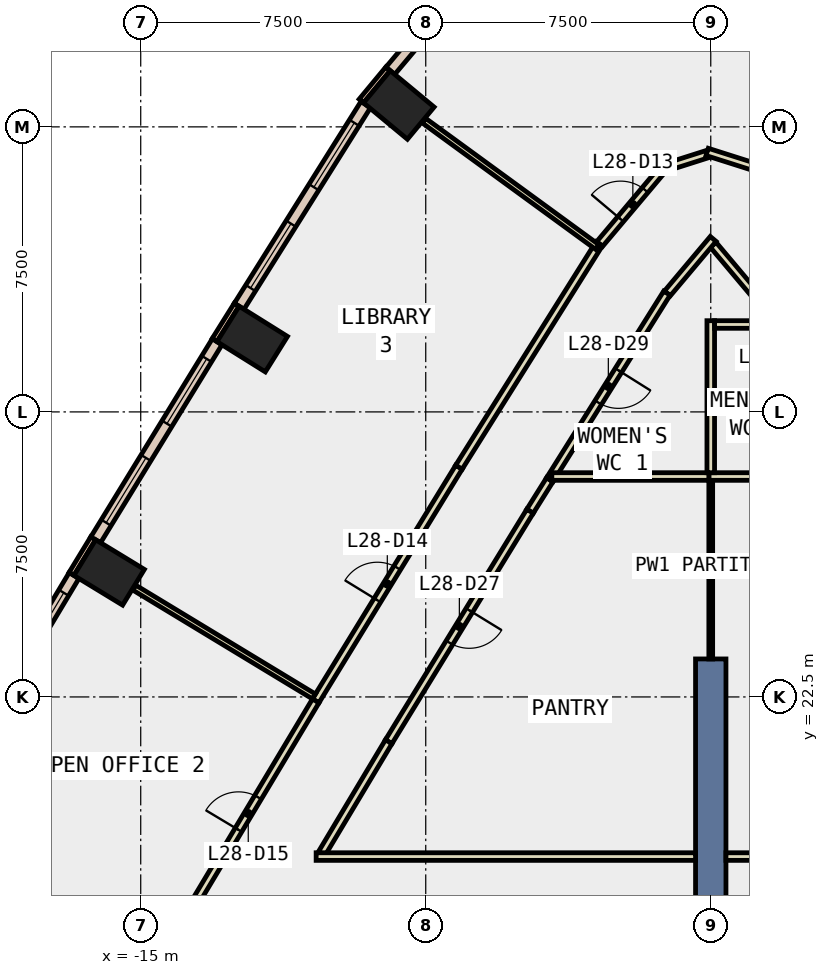
"""IFC4 building model, lengths in metres.
Left out: names, types, materials, properties, quantities, classifications, styles, units other than length and angle.
Written with IfcOpenShell. Run it as: python <this file> out.ifc"""

import sys

from ifc_helpers import new_model, si_unit, direction, frame, frame_2d, origin, origin_2d, place, context, subcontext, project, spatial, rectangle, extrude, element, fill, save


model = new_model("IFC4")
c1 = context("Model", 3, precision=1e-05, world=origin(), true_north=direction((0.0, 1.0)))
c2 = subcontext(c1, "Body", "Model", "MODEL_VIEW")
j1 = project(units=[si_unit("LENGTHUNIT", "METRE"), si_unit("PLANEANGLEUNIT", "RADIAN")], contexts=[c1])
p1 = place(None, origin())
s1 = spatial("IfcSite", under=j1, at=p1, CompositionType="ELEMENT")
p2 = place(p1, origin())
s2 = spatial("IfcBuilding", under=s1, at=p2, CompositionType="ELEMENT")
p3 = place(p2, frame((0.0, 0.0, 128.6)))
s3 = spatial("IfcBuildingStorey", under=s2, at=p3, CompositionType="ELEMENT", Elevation=128.6)
for number, where, z_axis, x_axis in (
    (1, (-8.208, 38.077, -0.4), (0.0, 0.0, 1.0), (0.638, 0.77, 0.0)),
    (2, (-12.066, 31.917, -0.4), (0.0, 0.0, 1.0), (0.53, 0.848, 0.0)),
    (3, (-15.831, 25.776, -0.4), (0.0, 0.0, 1.0), (0.52, 0.854, 0.0)),
):
    element("IfcColumn", number, at=place(p3, frame(where, z_axis=z_axis, x_axis=x_axis)), inside=s3, PredefinedType="COLUMN", context=c2, shape_type="SweptSolid", body=[
        extrude(rectangle(XDim=1.1, YDim=1.5, at=origin_2d()), origin(), (0.0, 0.0, 1.0), 4.0),
    ])
p4 = place(p3, frame((0.0, 14.5, -0.4), z_axis=(0.0, 0.0, 1.0), x_axis=(0.0, 1.0, 0.0)))
e4 = element("IfcWall", 4, at=p4, inside=s3, PredefinedType="SHEAR", context=c2, shape_type="SweptSolid", body=[
    extrude(rectangle(XDim=9.0, YDim=0.8, at=frame_2d((4.5, 0.0))), origin(), (0.0, 0.0, 1.0), 4.0),
])
p5 = place(p3, frame((-8.492, 39.027, 0.0), z_axis=(0.0, 0.0, 1.0), x_axis=(-0.638566874111, -0.769566337159, 0.0)))
e5 = element("IfcWall", 5, at=p5, inside=s3, PredefinedType="STANDARD", context=c2, shape_type="SweptSolid", body=[
    extrude(rectangle(XDim=1.1, YDim=0.15, at=frame_2d((0.55, 0.0))), origin(), (0.0, 0.0, 1.0), 3.6),
])
p6 = place(p3, frame((-12.474, 32.821, 0.0), z_axis=(0.0, 0.0, 1.0), x_axis=(-0.529719642941, -0.848172800721, 0.0)))
e6 = element("IfcWall", 6, at=p6, inside=s3, PredefinedType="STANDARD", context=c2, shape_type="SweptSolid", body=[
    extrude(rectangle(XDim=1.1, YDim=0.15, at=frame_2d((0.55, 0.0))), origin(), (0.0, 0.0, 1.0), 3.6),
])
p7 = place(p3, frame((-16.25, 26.675, 0.0), z_axis=(0.0, 0.0, 1.0), x_axis=(-0.519869515594, -0.854245682901, 0.0)))
e7 = element("IfcWall", 7, at=p7, inside=s3, PredefinedType="STANDARD", context=c2, shape_type="SweptSolid", body=[
    extrude(rectangle(XDim=1.1, YDim=0.15, at=frame_2d((0.55, 0.0))), origin(), (0.0, 0.0, 1.0), 3.6),
])
p8 = place(p3, frame((-5.767, 42.142, 0.0), z_axis=(0.0, 0.0, 1.0), x_axis=(-0.643948600943, -0.765068754652, 0.0)))
e8 = element("IfcWall", 8, at=p8, inside=s3, PredefinedType="STANDARD", context=c2, shape_type="SweptSolid", body=[
    extrude(rectangle(XDim=4.138, YDim=0.3, at=frame_2d((2.069, 0.0))), origin(), (0.0, 0.0, 1.0), 3.6),
])
p9 = place(p8, frame((1.369, 0.0, 0.9)))
e9 = element("IfcOpeningElement", 9, at=p9, cuts=e8, PredefinedType="OPENING", context=c2, shape_type="SweptSolid", body=[
    extrude(rectangle(XDim=1.4, YDim=2.6, at=frame_2d((0.7, 1.3))), frame((0.0, 0.16, 0.0), z_axis=(0.0, -1.0, 0.0), x_axis=(1.0, 0.0, 0.0)), (0.0, 0.0, 1.0), 0.32),
])
p10 = place(p3, frame((-9.079, 38.086, 0.0), z_axis=(0.0, 0.0, 1.0), x_axis=(-0.53160564075, -0.846991996847, 0.0)))
e10 = element("IfcWall", 10, at=p10, inside=s3, PredefinedType="STANDARD", context=c2, shape_type="SweptSolid", body=[
    extrude(rectangle(XDim=6.266, YDim=0.3, at=frame_2d((3.133, 0.0))), origin(), (0.0, 0.0, 1.0), 3.6),
])
p11 = place(p10, frame((0.566, 0.0, 0.9)))
e11 = element("IfcOpeningElement", 11, at=p11, cuts=e10, PredefinedType="OPENING", context=c2, shape_type="SweptSolid", body=[
    extrude(rectangle(XDim=2.0, YDim=2.6, at=frame_2d((1.0, 1.3))), frame((0.0, 0.16, 0.0), z_axis=(0.0, -1.0, 0.0), x_axis=(1.0, 0.0, 0.0)), (0.0, 0.0, 1.0), 0.32),
])
p12 = place(p10, frame((3.699, 0.0, 0.9)))
e12 = element("IfcOpeningElement", 12, at=p12, cuts=e10, PredefinedType="OPENING", context=c2, shape_type="SweptSolid", body=[
    extrude(rectangle(XDim=2.0, YDim=2.6, at=frame_2d((1.0, 1.3))), frame((0.0, 0.16, 0.0), z_axis=(0.0, -1.0, 0.0), x_axis=(1.0, 0.0, 0.0)), (0.0, 0.0, 1.0), 0.32),
])
p13 = place(p3, frame((-12.989, 31.846, 0.0), z_axis=(0.0, 0.0, 1.0), x_axis=(-0.522757750181, -0.8524812811, 0.0)))
e13 = element("IfcWall", 13, at=p13, inside=s3, PredefinedType="STANDARD", context=c2, shape_type="SweptSolid", body=[
    extrude(rectangle(XDim=6.114, YDim=0.3, at=frame_2d((3.057, 0.0))), origin(), (0.0, 0.0, 1.0), 3.6),
])
p14 = place(p13, frame((0.528, 0.0, 0.9)))
e14 = element("IfcOpeningElement", 14, at=p14, cuts=e13, PredefinedType="OPENING", context=c2, shape_type="SweptSolid", body=[
    extrude(rectangle(XDim=2.0, YDim=2.6, at=frame_2d((1.0, 1.3))), frame((0.0, 0.16, 0.0), z_axis=(0.0, -1.0, 0.0), x_axis=(1.0, 0.0, 0.0)), (0.0, 0.0, 1.0), 0.32),
])
p15 = place(p13, frame((3.585, 0.0, 0.9)))
e15 = element("IfcOpeningElement", 15, at=p15, cuts=e13, PredefinedType="OPENING", context=c2, shape_type="SweptSolid", body=[
    extrude(rectangle(XDim=2.0, YDim=2.6, at=frame_2d((1.0, 1.3))), frame((0.0, 0.16, 0.0), z_axis=(0.0, -1.0, 0.0), x_axis=(1.0, 0.0, 0.0)), (0.0, 0.0, 1.0), 0.32),
])
p16 = place(p3, frame((-16.754, 25.695, 0.0), z_axis=(0.0, 0.0, 1.0), x_axis=(-0.513708729904, -0.857964650099, 0.0)))
e16 = element("IfcWall", 16, at=p16, inside=s3, PredefinedType="STANDARD", context=c2, shape_type="SweptSolid", body=[
    extrude(rectangle(XDim=6.115, YDim=0.3, at=frame_2d((3.057, 0.0))), origin(), (0.0, 0.0, 1.0), 3.6),
])
p17 = place(p16, frame((0.529, 0.0, 0.9)))
e17 = element("IfcOpeningElement", 17, at=p17, cuts=e16, PredefinedType="OPENING", context=c2, shape_type="SweptSolid", body=[
    extrude(rectangle(XDim=2.0, YDim=2.6, at=frame_2d((1.0, 1.3))), frame((0.0, 0.16, 0.0), z_axis=(0.0, -1.0, 0.0), x_axis=(1.0, 0.0, 0.0)), (0.0, 0.0, 1.0), 0.32),
])
p18 = place(p16, frame((3.586, 0.0, 0.9)))
e18 = element("IfcOpeningElement", 18, at=p18, cuts=e16, PredefinedType="OPENING", context=c2, shape_type="SweptSolid", body=[
    extrude(rectangle(XDim=2.0, YDim=2.6, at=frame_2d((1.0, 1.3))), frame((0.0, 0.16, 0.0), z_axis=(0.0, -1.0, 0.0), x_axis=(1.0, 0.0, 0.0)), (0.0, 0.0, 1.0), 0.32),
])
p19 = place(p3, frame((-4.236, 28.215, 0.0), z_axis=(0.0, 0.0, 1.0), x_axis=(-0.531343659666, -0.84715637006, 0.0)))
e19 = element("IfcWall", 19, at=p19, inside=s3, PredefinedType="PARTITIONING", context=c2, shape_type="SweptSolid", body=[
    extrude(rectangle(XDim=0.979, YDim=0.2, at=frame_2d((0.489, 0.0))), origin(), (0.0, 0.0, 1.0), 3.6),
])
p20 = place(p3, frame((-4.756, 27.386, 0.0), z_axis=(0.0, 0.0, 1.0), x_axis=(-0.522743103274, -0.852490262689, 0.0)))
e20 = element("IfcWall", 20, at=p20, inside=s3, PredefinedType="PARTITIONING", context=c2, shape_type="SweptSolid", body=[
    extrude(rectangle(XDim=7.115, YDim=0.2, at=frame_2d((3.557, 0.0))), origin(), (0.0, 0.0, 1.0), 3.6),
])
p21 = place(p20, frame((3.057, 0.0, 0.0)))
e21 = element("IfcOpeningElement", 21, at=p21, cuts=e20, PredefinedType="OPENING", context=c2, shape_type="SweptSolid", body=[
    extrude(rectangle(XDim=1.0, YDim=2.1, at=frame_2d((0.5, 1.05))), frame((0.0, 0.11, 0.0), z_axis=(0.0, -1.0, 0.0), x_axis=(1.0, 0.0, 0.0)), (0.0, 0.0, 1.0), 0.22),
])
p22 = place(p3, frame((-8.475, 21.321, 0.0), z_axis=(0.0, 0.0, 1.0), x_axis=(-0.513592824646, -0.858034038062, 0.0)))
e22 = element("IfcWall", 22, at=p22, inside=s3, PredefinedType="PARTITIONING", context=c2, shape_type="SweptSolid", body=[
    extrude(rectangle(XDim=3.421, YDim=0.2, at=frame_2d((1.71, 0.0))), origin(), (0.0, 0.0, 1.0), 3.6),
])
p23 = place(p3, frame((1.271, 32.964, 0.0), z_axis=(0.0, 0.0, 1.0), x_axis=(-0.644007376392, 0.765019280249, 0.0)))
e23 = element("IfcWall", 23, at=p23, inside=s3, PredefinedType="PARTITIONING", context=c2, shape_type="SweptSolid", body=[
    extrude(rectangle(XDim=1.874, YDim=0.2, at=frame_2d((0.937, 0.0))), origin(), (0.0, 0.0, 1.0), 3.6),
])
p24 = place(p3, frame((0.064, 34.551, 0.0), z_axis=(0.0, 0.0, 1.0), x_axis=(-0.643638095982, -0.765329995101, 0.0)))
e24 = element("IfcWall", 24, at=p24, inside=s3, PredefinedType="PARTITIONING", context=c2, shape_type="SweptSolid", body=[
    extrude(rectangle(XDim=1.874, YDim=0.2, at=frame_2d((0.937, 0.0))), origin(), (0.0, 0.0, 1.0), 3.6),
])
p25 = place(p3, frame((-1.154, 33.125, 0.0), z_axis=(0.0, 0.0, 1.0), x_axis=(-0.531652223099, -0.846962758139, 0.0)))
e25 = element("IfcWall", 25, at=p25, inside=s3, PredefinedType="PARTITIONING", context=c2, shape_type="SweptSolid", body=[
    extrude(rectangle(XDim=5.797, YDim=0.2, at=frame_2d((2.898, 0.0))), origin(), (0.0, 0.0, 1.0), 3.6),
])
p26 = place(p25, frame((2.399, 0.0, 0.0)))
e26 = element("IfcOpeningElement", 26, at=p26, cuts=e25, PredefinedType="OPENING", context=c2, shape_type="SweptSolid", body=[
    extrude(rectangle(XDim=1.0, YDim=2.1, at=frame_2d((0.5, 1.05))), frame((0.0, 0.11, 0.0), z_axis=(0.0, -1.0, 0.0), x_axis=(1.0, 0.0, 0.0)), (0.0, 0.0, 1.0), 0.22),
])
p27 = place(p3, frame((-2.924, 34.417, 0.0), z_axis=(0.0, 0.0, 1.0), x_axis=(0.644113583568, 0.764929860486, 0.0)))
e27 = element("IfcWall", 27, at=p27, inside=s3, PredefinedType="PARTITIONING", context=c2, shape_type="SweptSolid", body=[
    extrude(rectangle(XDim=2.714, YDim=0.2, at=frame_2d((1.357, 0.0))), origin(), (0.0, 0.0, 1.0), 3.6),
])
p28 = place(p27, frame((0.857, 0.0, 0.0)))
e28 = element("IfcOpeningElement", 28, at=p28, cuts=e27, PredefinedType="OPENING", context=c2, shape_type="SweptSolid", body=[
    extrude(rectangle(XDim=1.0, YDim=2.1, at=frame_2d((0.5, 1.05))), frame((0.0, 0.11, 0.0), z_axis=(0.0, -1.0, 0.0), x_axis=(1.0, 0.0, 0.0)), (0.0, 0.0, 1.0), 0.22),
])
p29 = place(p3, frame((-1.145, 36.447, 0.0), z_axis=(0.0, 0.0, 1.0), x_axis=(0.952957783381, 0.303103056886, 0.0)))
e29 = element("IfcWall", 29, at=p29, inside=s3, PredefinedType="PARTITIONING", context=c2, shape_type="SweptSolid", body=[
    extrude(rectangle(XDim=1.102, YDim=0.2, at=frame_2d((0.551, 0.0))), origin(), (0.0, 0.0, 1.0), 3.6),
])
p30 = place(p3, frame((-0.095, 36.841, 0.0), z_axis=(0.0, 0.0, 1.0), x_axis=(0.953036611979, -0.302855107646, 0.0)))
e30 = element("IfcWall", 30, at=p30, inside=s3, PredefinedType="PARTITIONING", context=c2, shape_type="SweptSolid", body=[
    extrude(rectangle(XDim=1.301, YDim=0.2, at=frame_2d((0.65, 0.0))), origin(), (0.0, 0.0, 1.0), 3.6),
])
p31 = place(p3, frame((-10.396, 22.397, 0.0), z_axis=(0.0, 0.0, 1.0), x_axis=(0.522695398968, 0.852519512913, 0.0)))
e31 = element("IfcWall", 31, at=p31, inside=s3, PredefinedType="PARTITIONING", context=c2, shape_type="SweptSolid", body=[
    extrude(rectangle(XDim=7.213, YDim=0.2, at=frame_2d((3.606, 0.0))), origin(), (0.0, 0.0, 1.0), 3.6),
])
p32 = place(p31, frame((3.106, 0.0, 0.0)))
e32 = element("IfcOpeningElement", 32, at=p32, cuts=e31, PredefinedType="OPENING", context=c2, shape_type="SweptSolid", body=[
    extrude(rectangle(XDim=1.0, YDim=2.1, at=frame_2d((0.5, 1.05))), frame((0.0, 0.11, 0.0), z_axis=(0.0, -1.0, 0.0), x_axis=(1.0, 0.0, 0.0)), (0.0, 0.0, 1.0), 0.22),
])
p33 = place(p3, frame((-6.626, 28.546, 0.0), z_axis=(0.0, 0.0, 1.0), x_axis=(0.531701842465, 0.846931609234, 0.0)))
e33 = element("IfcWall", 33, at=p33, inside=s3, PredefinedType="PARTITIONING", context=c2, shape_type="SweptSolid", body=[
    extrude(rectangle(XDim=6.942, YDim=0.2, at=frame_2d((3.471, 0.0))), origin(), (0.0, 0.0, 1.0), 3.6),
])
p34 = place(p3, frame((-14.023, 16.338, 0.0), z_axis=(0.0, 0.0, 1.0), x_axis=(0.513773581048, 0.857925816966, 0.0)))
e34 = element("IfcWall", 34, at=p34, inside=s3, PredefinedType="PARTITIONING", context=c2, shape_type="SweptSolid", body=[
    extrude(rectangle(XDim=7.061, YDim=0.2, at=frame_2d((3.531, 0.0))), origin(), (0.0, 0.0, 1.0), 3.6),
])
p35 = place(p34, frame((3.106, 0.0, 0.0)))
e35 = element("IfcOpeningElement", 35, at=p35, cuts=e34, PredefinedType="OPENING", context=c2, shape_type="SweptSolid", body=[
    extrude(rectangle(XDim=1.0, YDim=2.1, at=frame_2d((0.5, 1.05))), frame((0.0, 0.11, 0.0), z_axis=(0.0, -1.0, 0.0), x_axis=(1.0, 0.0, 0.0)), (0.0, 0.0, 1.0), 0.22),
])
for number, where, z_axis, x_axis in (
    (36, (0.4, 18.3, 0.0), (0.0, 0.0, 1.0), (1.0, 0.0, 0.0)),
    (37, (-10.384, 18.3, 0.0), (0.0, 0.0, 1.0), (1.0, 0.0, 0.0)),
):
    element("IfcWall", number, at=place(p3, frame(where, z_axis=z_axis, x_axis=x_axis)), inside=s3, PredefinedType="PARTITIONING", context=c2, shape_type="SweptSolid", body=[
        extrude(rectangle(XDim=9.984, YDim=0.2, at=frame_2d((4.992, 0.0))), origin(), (0.0, 0.0, 1.0), 3.6),
    ])
p36 = place(p3, frame((0.0, 23.5, 0.0), z_axis=(0.0, 0.0, 1.0), x_axis=(0.0, 1.0, 0.0)))
e38 = element("IfcWall", 38, at=p36, inside=s3, PredefinedType="PARTITIONING", context=c2, shape_type="SweptSolid", body=[
    extrude(rectangle(XDim=4.9, YDim=0.1, at=frame_2d((2.45, 0.0))), origin(), (0.0, 0.0, 1.0), 3.6),
])
p37 = place(p3, frame((-0.05, 28.3, 0.0), z_axis=(0.0, 0.0, 1.0), x_axis=(1.0, 0.0, 0.0)))
e39 = element("IfcWall", 39, at=p37, inside=s3, PredefinedType="PARTITIONING", context=c2, shape_type="SweptSolid", body=[
    extrude(rectangle(XDim=4.232, YDim=0.2, at=frame_2d((2.116, 0.0))), origin(), (0.0, 0.0, 1.0), 3.6),
])
p38 = place(p3, frame((-4.182, 28.3, 0.0), z_axis=(0.0, 0.0, 1.0), x_axis=(1.0, 0.0, 0.0)))
e40 = element("IfcWall", 40, at=p38, inside=s3, PredefinedType="PARTITIONING", context=c2, shape_type="SweptSolid", body=[
    extrude(rectangle(XDim=4.132, YDim=0.2, at=frame_2d((2.066, 0.0))), origin(), (0.0, 0.0, 1.0), 3.6),
])
p39 = place(p3, frame((0.0, 28.4, 0.0), z_axis=(0.0, 0.0, 1.0), x_axis=(0.0, 1.0, 0.0)))
e41 = element("IfcWall", 41, at=p39, inside=s3, PredefinedType="PARTITIONING", context=c2, shape_type="SweptSolid", body=[
    extrude(rectangle(XDim=4.0, YDim=0.2, at=frame_2d((2.0, 0.0))), origin(), (0.0, 0.0, 1.0), 3.6),
])
p40 = place(p3, frame((0.1, 32.3, 0.0), z_axis=(0.0, 0.0, 1.0), x_axis=(1.0, 0.0, 0.0)))
e42 = element("IfcWall", 42, at=p40, inside=s3, PredefinedType="PARTITIONING", context=c2, shape_type="SweptSolid", body=[
    extrude(rectangle(XDim=1.572, YDim=0.2, at=frame_2d((0.786, 0.0))), origin(), (0.0, 0.0, 1.0), 3.6),
])
p41 = place(p3, frame((-2.989, 34.34, 0.0), z_axis=(0.0, 0.0, 1.0), x_axis=(-0.807932877043, 0.589274525322, 0.0)))
e43 = element("IfcWall", 43, at=p41, inside=s3, PredefinedType="PARTITIONING", context=c2, shape_type="SweptSolid", body=[
    extrude(rectangle(XDim=5.644, YDim=0.15, at=frame_2d((2.822, 0.0))), origin(), (0.0, 0.0, 1.0), 3.6),
])
p42 = place(p3, frame((-10.442, 22.513, 0.0), z_axis=(0.0, 0.0, 1.0), x_axis=(-0.855343076014, 0.518061986943, 0.0)))
e44 = element("IfcWall", 44, at=p42, inside=s3, PredefinedType="PARTITIONING", context=c2, shape_type="SweptSolid", body=[
    extrude(rectangle(XDim=5.53, YDim=0.15, at=frame_2d((2.765, 0.0))), origin(), (0.0, 0.0, 1.0), 3.6),
])
p43 = place(p11, origin())
e45 = element("IfcWindow", 45, at=p43, inside=s3, PartitioningType="SINGLE_PANEL", PredefinedType="WINDOW", context=c2, shape_type="SweptSolid", body=[
    extrude(rectangle(XDim=2.0, YDim=2.6, at=frame_2d((1.0, 1.3))), frame((0.0, 0.03, 0.0), z_axis=(0.0, -1.0, 0.0), x_axis=(1.0, 0.0, 0.0)), (0.0, 0.0, 1.0), 0.06),
])
fill(e11, e45)
p44 = place(p12, origin())
e46 = element("IfcWindow", 46, at=p44, inside=s3, PartitioningType="SINGLE_PANEL", PredefinedType="WINDOW", context=c2, shape_type="SweptSolid", body=[
    extrude(rectangle(XDim=2.0, YDim=2.6, at=frame_2d((1.0, 1.3))), frame((0.0, 0.03, 0.0), z_axis=(0.0, -1.0, 0.0), x_axis=(1.0, 0.0, 0.0)), (0.0, 0.0, 1.0), 0.06),
])
fill(e12, e46)
p45 = place(p14, origin())
e47 = element("IfcWindow", 47, at=p45, inside=s3, PartitioningType="SINGLE_PANEL", PredefinedType="WINDOW", context=c2, shape_type="SweptSolid", body=[
    extrude(rectangle(XDim=2.0, YDim=2.6, at=frame_2d((1.0, 1.3))), frame((0.0, 0.03, 0.0), z_axis=(0.0, -1.0, 0.0), x_axis=(1.0, 0.0, 0.0)), (0.0, 0.0, 1.0), 0.06),
])
fill(e14, e47)
p46 = place(p15, origin())
e48 = element("IfcWindow", 48, at=p46, inside=s3, PartitioningType="SINGLE_PANEL", PredefinedType="WINDOW", context=c2, shape_type="SweptSolid", body=[
    extrude(rectangle(XDim=2.0, YDim=2.6, at=frame_2d((1.0, 1.3))), frame((0.0, 0.03, 0.0), z_axis=(0.0, -1.0, 0.0), x_axis=(1.0, 0.0, 0.0)), (0.0, 0.0, 1.0), 0.06),
])
fill(e15, e48)
p47 = place(p17, origin())
e49 = element("IfcWindow", 49, at=p47, inside=s3, PartitioningType="SINGLE_PANEL", PredefinedType="WINDOW", context=c2, shape_type="SweptSolid", body=[
    extrude(rectangle(XDim=2.0, YDim=2.6, at=frame_2d((1.0, 1.3))), frame((0.0, 0.03, 0.0), z_axis=(0.0, -1.0, 0.0), x_axis=(1.0, 0.0, 0.0)), (0.0, 0.0, 1.0), 0.06),
])
fill(e17, e49)
p48 = place(p28, origin())
e50 = element("IfcDoor", 50, at=p48, inside=s3, OperationType="SINGLE_SWING_LEFT", PredefinedType="DOOR", context=c2, shape_type="SweptSolid", body=[
    extrude(rectangle(XDim=1.0, YDim=2.1, at=frame_2d((0.5, 1.05))), frame((0.0, 0.025, 0.0), z_axis=(0.0, -1.0, 0.0), x_axis=(1.0, 0.0, 0.0)), (0.0, 0.0, 1.0), 0.05),
])
fill(e28, e50)
p49 = place(p32, origin())
e51 = element("IfcDoor", 51, at=p49, inside=s3, OperationType="SINGLE_SWING_LEFT", PredefinedType="DOOR", context=c2, shape_type="SweptSolid", body=[
    extrude(rectangle(XDim=1.0, YDim=2.1, at=frame_2d((0.5, 1.05))), frame((0.0, 0.025, 0.0), z_axis=(0.0, -1.0, 0.0), x_axis=(1.0, 0.0, 0.0)), (0.0, 0.0, 1.0), 0.05),
])
fill(e32, e51)
p50 = place(p35, origin())
e52 = element("IfcDoor", 52, at=p50, inside=s3, OperationType="SINGLE_SWING_LEFT", PredefinedType="DOOR", context=c2, shape_type="SweptSolid", body=[
    extrude(rectangle(XDim=1.0, YDim=2.1, at=frame_2d((0.5, 1.05))), frame((0.0, 0.025, 0.0), z_axis=(0.0, -1.0, 0.0), x_axis=(1.0, 0.0, 0.0)), (0.0, 0.0, 1.0), 0.05),
])
fill(e35, e52)
p51 = place(p21, origin())
e53 = element("IfcDoor", 53, at=p51, inside=s3, OperationType="SINGLE_SWING_RIGHT", PredefinedType="DOOR", context=c2, shape_type="SweptSolid", body=[
    extrude(rectangle(XDim=1.0, YDim=2.1, at=frame_2d((0.5, 1.05))), frame((0.0, 0.025, 0.0), z_axis=(0.0, -1.0, 0.0), x_axis=(1.0, 0.0, 0.0)), (0.0, 0.0, 1.0), 0.05),
])
fill(e21, e53)
p52 = place(p26, origin())
e54 = element("IfcDoor", 54, at=p52, inside=s3, OperationType="SINGLE_SWING_LEFT", PredefinedType="DOOR", context=c2, shape_type="SweptSolid", body=[
    extrude(rectangle(XDim=1.0, YDim=2.1, at=frame_2d((0.5, 1.05))), frame((0.0, 0.025, 0.0), z_axis=(0.0, -1.0, 0.0), x_axis=(1.0, 0.0, 0.0)), (0.0, 0.0, 1.0), 0.05),
])
fill(e26, e54)
save(model, sys.argv[1])
